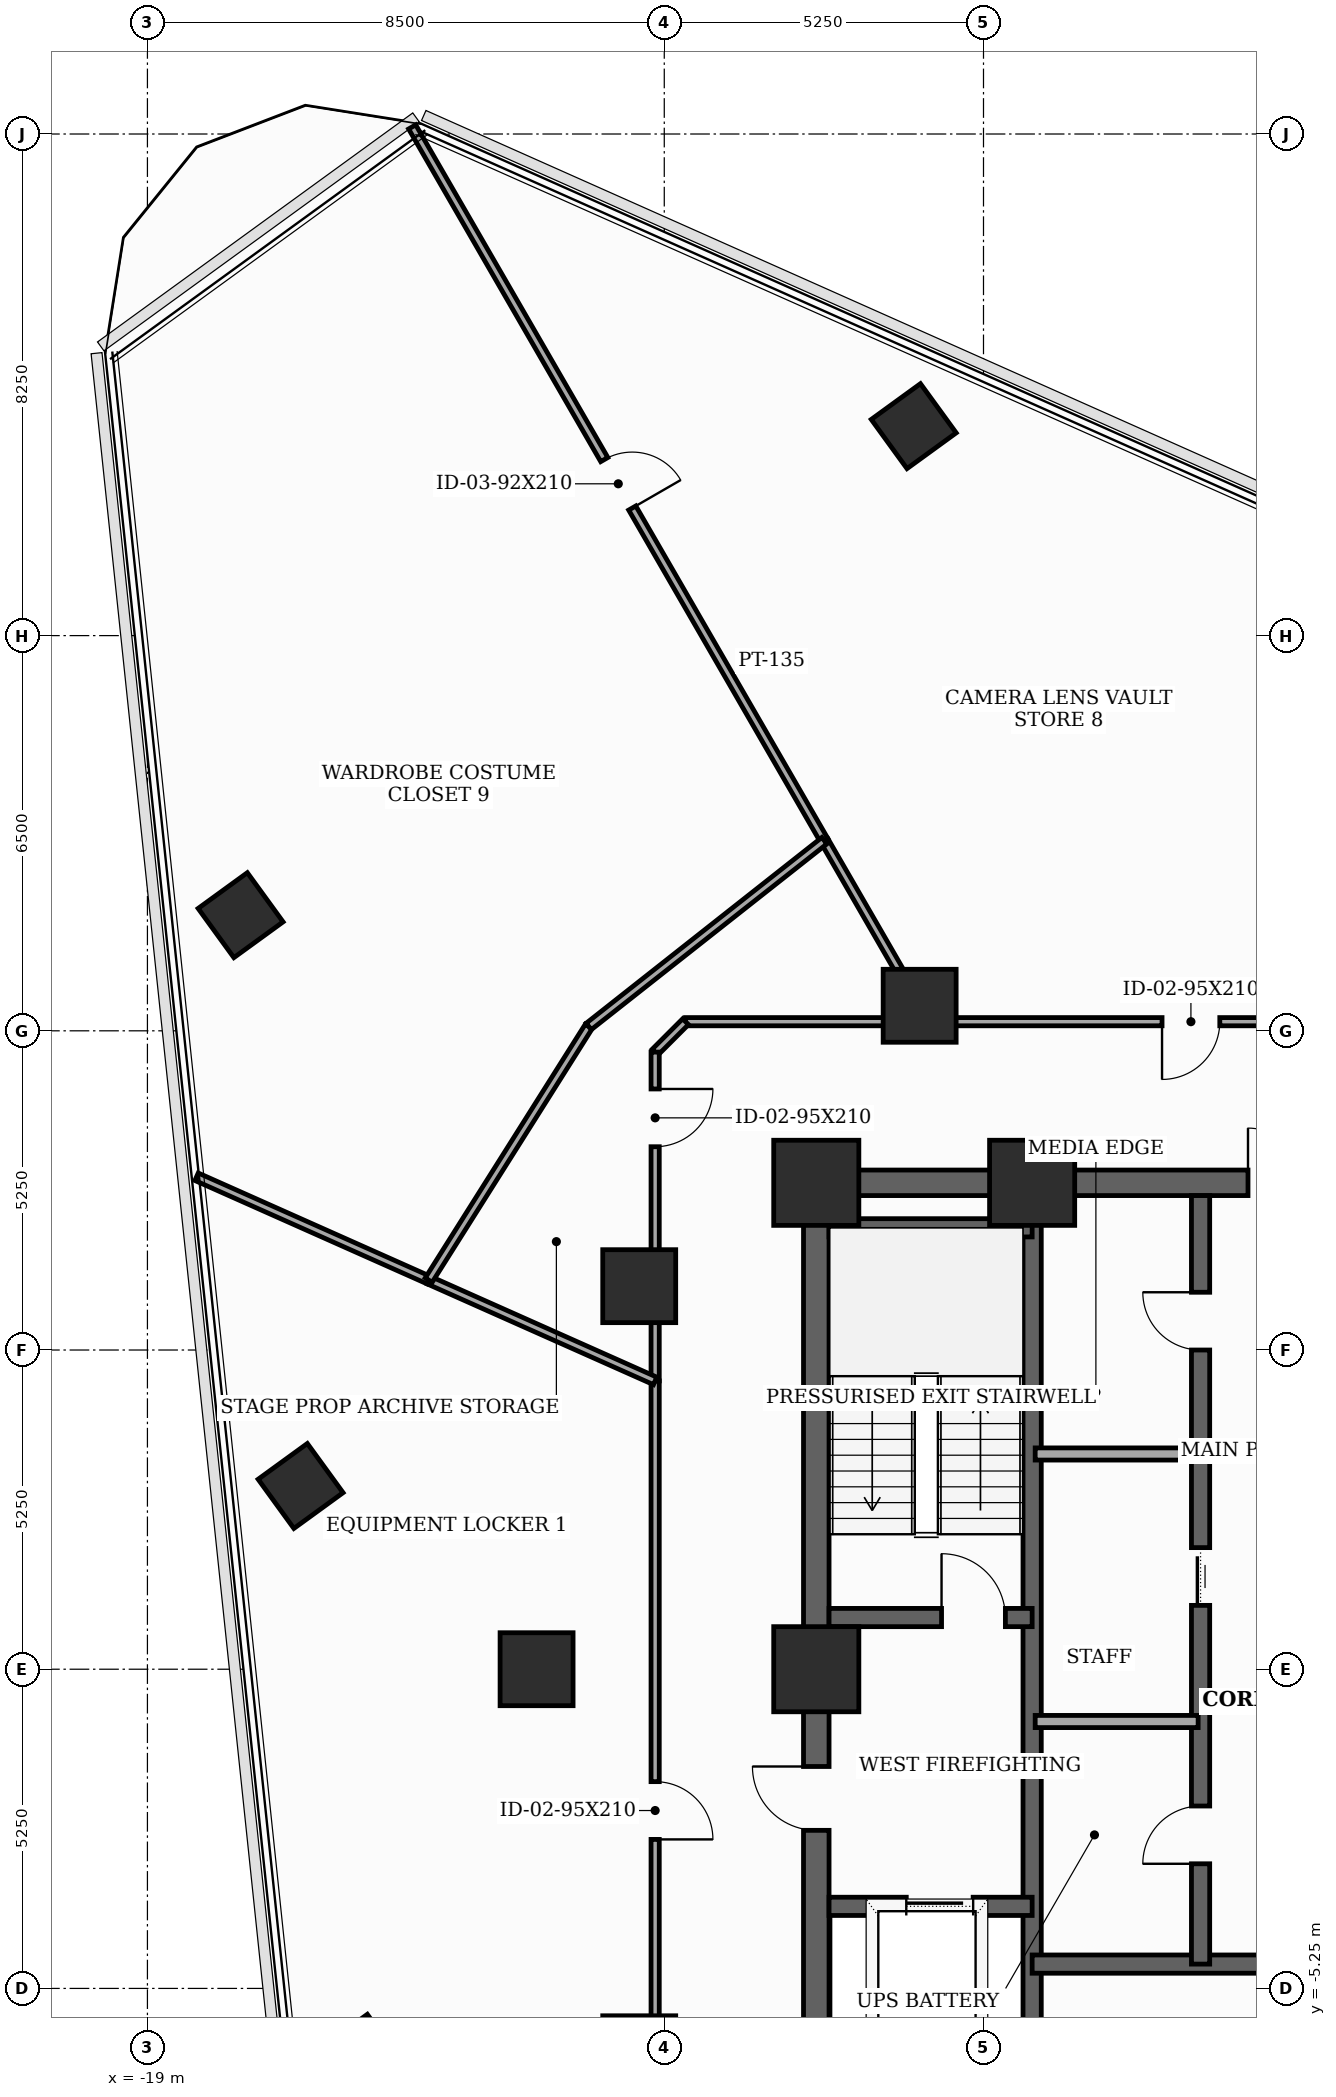
"""IFC4 building model, lengths in metres.
Left out: names, types, materials, properties, quantities, classifications, styles, units other than length and angle.
Written with IfcOpenShell. Run it as: python <this file> out.ifc"""

import sys

from ifc_helpers import new_model, si_unit, direction, frame, frame_2d, origin, origin_2d, place, context, subcontext, project, spatial, rectangle, extrude, element, fill, save


model = new_model("IFC4")
c1 = context("Model", 3, precision=1e-05, world=origin(), true_north=direction((0.0, 1.0)))
c2 = subcontext(c1, "Body", "Model", "MODEL_VIEW")
j1 = project(units=[si_unit("LENGTHUNIT", "METRE"), si_unit("PLANEANGLEUNIT", "RADIAN")], contexts=[c1])
p1 = place(None, origin())
s1 = spatial("IfcSite", under=j1, at=p1, CompositionType="ELEMENT")
p2 = place(p1, origin())
s2 = spatial("IfcBuilding", under=s1, at=p2, CompositionType="ELEMENT")
p3 = place(p2, frame((0.0, 0.0, 162.0)))
s3 = spatial("IfcBuildingStorey", under=s2, at=p3, CompositionType="ELEMENT", Elevation=162.0)
for number, where, z_axis, x_axis in (
    (1, (-4.45, 8.0, 0.0), (0.0, 0.0, 1.0), (1.0, 0.0, 0.0)),
    (2, (-8.0, 8.0, 0.0), (0.0, 0.0, 1.0), (1.0, 0.0, 0.0)),
    (3, (-8.0, 0.0, 0.0), (0.0, 0.0, 1.0), (1.0, 0.0, 0.0)),
):
    element("IfcColumn", number, at=place(p3, frame(where, z_axis=z_axis, x_axis=x_axis)), inside=s3, PredefinedType="COLUMN", context=c2, shape_type="SweptSolid", body=[
        extrude(rectangle(XDim=1.4, YDim=1.4, at=origin_2d()), origin(), (0.0, 0.0, 1.0), 3.7),
    ])
for number, where, z_axis, x_axis in (
    (4, (-6.3, 10.912, 0.0), (0.0, 0.0, 1.0), (1.0, 0.0, 0.0)),
    (5, (-10.912, 6.3, 0.0), (0.0, 0.0, 1.0), (1.0, 0.0, 0.0)),
    (6, (-12.6, 0.0, 0.0), (0.0, 0.0, 1.0), (1.0, 0.0, 0.0)),
    (7, (-10.912, -6.3, 0.0), (0.0, 0.0, 1.0), (1.0, 0.0, 0.0)),
):
    element("IfcColumn", number, at=place(p3, frame(where, z_axis=z_axis, x_axis=x_axis)), inside=s3, PredefinedType="COLUMN", context=c2, shape_type="SweptSolid", body=[
        extrude(rectangle(XDim=1.2, YDim=1.2, at=origin_2d()), origin(), (0.0, 0.0, 1.0), 3.7),
    ])
for number, where, z_axis, x_axis in (
    (8, (-6.397, 20.445, 0.0), (0.0, 0.0, 1.0), (0.809, 0.588, 0.0)),
    (9, (-17.468, 12.402, 0.0), (0.0, 0.0, 1.0), (0.809, 0.588, 0.0)),
    (10, (-16.481, 3.014, 0.0), (0.0, 0.0, 1.0), (0.809, 0.588, 0.0)),
    (11, (-15.494, -6.375, 0.0), (0.0, 0.0, 1.0), (0.809, 0.588, 0.0)),
):
    element("IfcColumn", number, at=place(p3, frame(where, z_axis=z_axis, x_axis=x_axis)), inside=s3, PredefinedType="COLUMN", context=c2, shape_type="SweptSolid", body=[
        extrude(rectangle(XDim=1.0, YDim=1.0, at=origin_2d()), origin(), (0.0, 0.0, 1.0), 3.7),
    ])
p4 = place(p3, frame((-8.0, -8.0, 0.0), z_axis=(0.0, 0.0, 1.0), x_axis=(0.0, 1.0, 0.0)))
e12 = element("IfcWall", 12, at=p4, inside=s3, PredefinedType="SHEAR", context=c2, shape_type="SweptSolid", body=[
    extrude(rectangle(XDim=16.0, YDim=0.42, at=frame_2d((8.0, 0.0))), origin(), (0.0, 0.0, 1.0), 3.5),
])
p5 = place(p4, frame((0.922, 0.0, 0.0)))
e13 = element("IfcOpeningElement", 13, at=p5, cuts=e12, PredefinedType="OPENING", context=c2, shape_type="SweptSolid", body=[
    extrude(rectangle(XDim=0.85, YDim=2.02, at=frame_2d((0.425, 1.01))), frame((0.0, 0.22, 0.0), z_axis=(0.0, -1.0, 0.0), x_axis=(1.0, 0.0, 0.0)), (0.0, 0.0, 1.0), 0.44),
])
p6 = place(p4, frame((5.35, 0.0, 0.0)))
e14 = element("IfcOpeningElement", 14, at=p6, cuts=e12, PredefinedType="OPENING", context=c2, shape_type="SweptSolid", body=[
    extrude(rectangle(XDim=1.05, YDim=2.15, at=frame_2d((0.525, 1.075))), frame((0.0, 0.22, 0.0), z_axis=(0.0, -1.0, 0.0), x_axis=(1.0, 0.0, 0.0)), (0.0, 0.0, 1.0), 0.44),
])
p7 = place(p3, frame((-8.0, 8.0, 0.0), z_axis=(0.0, 0.0, 1.0), x_axis=(1.0, 0.0, 0.0)))
e15 = element("IfcWall", 15, at=p7, inside=s3, PredefinedType="SHEAR", context=c2, shape_type="SweptSolid", body=[
    extrude(rectangle(XDim=16.0, YDim=0.42, at=frame_2d((8.0, 0.0))), origin(), (0.0, 0.0, 1.0), 3.5),
])
p8 = place(p7, frame((7.1, 0.0, 0.0)))
e16 = element("IfcOpeningElement", 16, at=p8, cuts=e15, PredefinedType="OPENING", context=c2, shape_type="SweptSolid", body=[
    extrude(rectangle(XDim=1.8, YDim=2.15, at=frame_2d((0.9, 1.075))), frame((0.0, 0.22, 0.0), z_axis=(0.0, -1.0, 0.0), x_axis=(1.0, 0.0, 0.0)), (0.0, 0.0, 1.0), 0.44),
])
p9 = place(p3, frame((-4.45, -7.79, 0.0), z_axis=(0.0, 0.0, 1.0), x_axis=(0.0, 1.0, 0.0)))
e17 = element("IfcWall", 17, at=p9, inside=s3, PredefinedType="SHEAR", context=c2, shape_type="SweptSolid", body=[
    extrude(rectangle(XDim=15.58, YDim=0.3, at=frame_2d((7.79, 0.0))), origin(), (0.0, 0.0, 1.0), 3.5),
])
p10 = place(p3, frame((-7.79, 0.85, 0.0), z_axis=(0.0, 0.0, 1.0), x_axis=(1.0, 0.0, 0.0)))
e18 = element("IfcWall", 18, at=p10, inside=s3, PredefinedType="SHEAR", context=c2, shape_type="SweptSolid", body=[
    extrude(rectangle(XDim=3.34, YDim=0.3, at=frame_2d((1.67, 0.0))), origin(), (0.0, 0.0, 1.0), 3.5),
])
p11 = place(p10, frame((1.85, 0.0, 0.0)))
e19 = element("IfcOpeningElement", 19, at=p11, cuts=e18, PredefinedType="OPENING", context=c2, shape_type="SweptSolid", body=[
    extrude(rectangle(XDim=1.05, YDim=2.15, at=frame_2d((0.525, 1.075))), frame((0.0, 0.16, 0.0), z_axis=(0.0, -1.0, 0.0), x_axis=(1.0, 0.0, 0.0)), (0.0, 0.0, 1.0), 0.32),
])
p12 = place(p3, frame((-7.79, 7.26, 0.0), z_axis=(0.0, 0.0, 1.0), x_axis=(1.0, 0.0, 0.0)))
e20 = element("IfcWall", 20, at=p12, inside=s3, PredefinedType="SHEAR", context=c2, shape_type="SweptSolid", body=[
    extrude(rectangle(XDim=3.34, YDim=0.3, at=frame_2d((1.67, 0.0))), origin(), (0.0, 0.0, 1.0), 3.5),
])
p13 = place(p3, frame((-7.79, -3.9, 0.0), z_axis=(0.0, 0.0, 1.0), x_axis=(1.0, 0.0, 0.0)))
e21 = element("IfcWall", 21, at=p13, inside=s3, PredefinedType="SHEAR", context=c2, shape_type="SweptSolid", body=[
    extrude(rectangle(XDim=3.34, YDim=0.3, at=frame_2d((1.67, 0.0))), origin(), (0.0, 0.0, 1.0), 3.5),
])
p14 = place(p13, frame((1.27, 0.0, 0.0)))
e22 = element("IfcOpeningElement", 22, at=p14, cuts=e21, PredefinedType="OPENING", context=c2, shape_type="SweptSolid", body=[
    extrude(rectangle(XDim=1.1, YDim=2.1, at=frame_2d((0.55, 1.05))), frame((0.0, 0.16, 0.0), z_axis=(0.0, -1.0, 0.0), x_axis=(1.0, 0.0, 0.0)), (0.0, 0.0, 1.0), 0.32),
])
p15 = place(p3, frame((-4.45, -4.85, 0.0), z_axis=(0.0, 0.0, 1.0), x_axis=(1.0, 0.0, 0.0)))
e23 = element("IfcWall", 23, at=p15, inside=s3, PredefinedType="SHEAR", context=c2, shape_type="SweptSolid", body=[
    extrude(rectangle(XDim=8.9, YDim=0.3, at=frame_2d((4.45, 0.0))), origin(), (0.0, 0.0, 1.0), 3.5),
])
p16 = place(p3, frame((-1.68, -4.85, 0.0), z_axis=(0.0, 0.0, 1.0), x_axis=(0.0, 1.0, 0.0)))
e24 = element("IfcWall", 24, at=p16, inside=s3, PredefinedType="SHEAR", context=c2, shape_type="SweptSolid", body=[
    extrude(rectangle(XDim=12.64, YDim=0.3, at=frame_2d((6.32, 0.0))), origin(), (0.0, 0.0, 1.0), 3.5),
])
p17 = place(p16, frame((1.65, 0.0, 0.0)))
e25 = element("IfcOpeningElement", 25, at=p17, cuts=e24, PredefinedType="OPENING", context=c2, shape_type="SweptSolid", body=[
    extrude(rectangle(XDim=0.95, YDim=2.1, at=frame_2d((0.475, 1.05))), frame((0.0, 0.16, 0.0), z_axis=(0.0, -1.0, 0.0), x_axis=(1.0, 0.0, 0.0)), (0.0, 0.0, 1.0), 0.32),
])
p18 = place(p16, frame((5.9, 0.0, 0.0)))
e26 = element("IfcOpeningElement", 26, at=p18, cuts=e24, PredefinedType="OPENING", context=c2, shape_type="SweptSolid", body=[
    extrude(rectangle(XDim=0.95, YDim=2.1, at=frame_2d((0.475, 1.05))), frame((0.0, 0.16, 0.0), z_axis=(0.0, -1.0, 0.0), x_axis=(1.0, 0.0, 0.0)), (0.0, 0.0, 1.0), 0.32),
])
p19 = place(p16, frame((10.1, 0.0, 0.0)))
e27 = element("IfcOpeningElement", 27, at=p19, cuts=e24, PredefinedType="OPENING", context=c2, shape_type="SweptSolid", body=[
    extrude(rectangle(XDim=0.95, YDim=2.1, at=frame_2d((0.475, 1.05))), frame((0.0, 0.16, 0.0), z_axis=(0.0, -1.0, 0.0), x_axis=(1.0, 0.0, 0.0)), (0.0, 0.0, 1.0), 0.32),
])
for number, where, z_axis, x_axis in (
    (28, (-4.4, -0.86, 0.0), (0.0, 0.0, 1.0), (1.0, 0.0, 0.0)),
    (29, (-4.4, 3.54, 0.0), (0.0, 0.0, 1.0), (1.0, 0.0, 0.0)),
):
    element("IfcWall", number, at=place(p3, frame(where, z_axis=z_axis, x_axis=x_axis)), inside=s3, PredefinedType="SOLIDWALL", context=c2, shape_type="SweptSolid", body=[
        extrude(rectangle(XDim=2.68, YDim=0.2, at=frame_2d((1.34, 0.0))), origin(), (0.0, 0.0, 1.0), 3.5),
    ])
p20 = place(p3, frame((-10.65, 4.742, 0.0), z_axis=(0.0, 0.0, 1.0), x_axis=(0.0, -1.0, 0.0)))
e30 = element("IfcWall", 30, at=p20, inside=s3, PredefinedType="PARTITIONING", context=c2, shape_type="SweptSolid", body=[
    extrude(rectangle(XDim=11.397, YDim=0.135, at=frame_2d((5.698, 0.0))), origin(), (0.0, 0.0, 1.0), 2.885),
])
p21 = place(p20, frame((6.591, 0.0, 0.0)))
e31 = element("IfcOpeningElement", 31, at=p21, cuts=e30, PredefinedType="OPENING", context=c2, shape_type="SweptSolid", body=[
    extrude(rectangle(XDim=0.95, YDim=2.1, at=frame_2d((0.475, 1.05))), frame((0.0, 0.077, 0.0), z_axis=(0.0, -1.0, 0.0), x_axis=(1.0, 0.0, 0.0)), (0.0, 0.0, 1.0), 0.155),
])
p22 = place(p3, frame((5.194, 10.65, 0.0), z_axis=(0.0, 0.0, 1.0), x_axis=(-1.0, 0.0, 0.0)))
e32 = element("IfcWall", 32, at=p22, inside=s3, PredefinedType="PARTITIONING", context=c2, shape_type="SweptSolid", body=[
    extrude(rectangle(XDim=11.343, YDim=0.135, at=frame_2d((5.671, 0.0))), origin(), (0.0, 0.0, 1.0), 2.885),
])
p23 = place(p22, frame((6.558, 0.0, 0.0)))
e33 = element("IfcOpeningElement", 33, at=p23, cuts=e32, PredefinedType="OPENING", context=c2, shape_type="SweptSolid", body=[
    extrude(rectangle(XDim=0.95, YDim=2.1, at=frame_2d((0.475, 1.05))), frame((0.0, 0.077, 0.0), z_axis=(0.0, -1.0, 0.0), x_axis=(1.0, 0.0, 0.0)), (0.0, 0.0, 1.0), 0.155),
])
p24 = place(p3, frame((-6.149, 10.65, 0.0), z_axis=(0.0, 0.0, 1.0), x_axis=(-1.0, 0.0, 0.0)))
e34 = element("IfcWall", 34, at=p24, inside=s3, PredefinedType="PARTITIONING", context=c2, shape_type="SweptSolid", body=[
    extrude(rectangle(XDim=4.001, YDim=0.135, at=frame_2d((2.0, 0.0))), origin(), (0.0, 0.0, 1.0), 2.885),
])
p25 = place(p3, frame((-10.15, 10.65, 0.0), z_axis=(0.0, 0.0, 1.0), x_axis=(-0.707106781187, -0.707106781187, 0.0)))
e35 = element("IfcWall", 35, at=p25, inside=s3, PredefinedType="PARTITIONING", context=c2, shape_type="SweptSolid", body=[
    extrude(rectangle(XDim=0.707, YDim=0.135, at=frame_2d((0.354, 0.0))), origin(), (0.0, 0.0, 1.0), 3.5),
])
p26 = place(p3, frame((-10.65, 10.15, 0.0), z_axis=(0.0, 0.0, 1.0), x_axis=(0.0, -1.0, 0.0)))
e36 = element("IfcWall", 36, at=p26, inside=s3, PredefinedType="PARTITIONING", context=c2, shape_type="SweptSolid", body=[
    extrude(rectangle(XDim=5.408, YDim=0.135, at=frame_2d((2.704, 0.0))), origin(), (0.0, 0.0, 1.0), 2.885),
])
p27 = place(p26, frame((0.607, 0.0, 0.0)))
e37 = element("IfcOpeningElement", 37, at=p27, cuts=e36, PredefinedType="OPENING", context=c2, shape_type="SweptSolid", body=[
    extrude(rectangle(XDim=0.95, YDim=2.1, at=frame_2d((0.475, 1.05))), frame((0.0, 0.077, 0.0), z_axis=(0.0, -1.0, 0.0), x_axis=(1.0, 0.0, 0.0)), (0.0, 0.0, 1.0), 0.155),
])
p28 = place(p3, frame((-14.374, 6.4, 0.0), z_axis=(0.0, 0.0, 1.0), x_axis=(-0.913556010805, 0.406712939457, 0.0)))
e38 = element("IfcWall", 38, at=p28, inside=s3, PredefinedType="PARTITIONING", context=c2, shape_type="SweptSolid", body=[
    extrude(rectangle(XDim=4.179, YDim=0.135, at=frame_2d((2.09, 0.0))), origin(), (0.0, 0.0, 1.0), 2.985),
])
p29 = place(p3, frame((-10.65, 4.742, 0.0), z_axis=(0.0, 0.0, 1.0), x_axis=(-0.913556992648, 0.406710734042, 0.0)))
e39 = element("IfcWall", 39, at=p29, inside=s3, PredefinedType="PARTITIONING", context=c2, shape_type="SweptSolid", body=[
    extrude(rectangle(XDim=4.076, YDim=0.135, at=frame_2d((2.038, 0.0))), origin(), (0.0, 0.0, 1.0), 2.885),
])
p30 = place(p3, frame((-14.646, 25.367, 0.0), z_axis=(0.0, 0.0, 1.0), x_axis=(0.500047745944, -0.865997835896, 0.0)))
e40 = element("IfcWall", 40, at=p30, inside=s3, PredefinedType="PARTITIONING", context=c2, shape_type="SweptSolid", body=[
    extrude(rectangle(XDim=13.556, YDim=0.135, at=frame_2d((6.778, 0.0))), origin(), (0.0, 0.0, 1.0), 2.985),
])
p31 = place(p30, frame((6.318, 0.0, 0.0)))
e41 = element("IfcOpeningElement", 41, at=p31, cuts=e40, PredefinedType="OPENING", context=c2, shape_type="SweptSolid", body=[
    extrude(rectangle(XDim=0.92, YDim=2.1, at=frame_2d((0.46, 1.05))), frame((0.0, 0.077, 0.0), z_axis=(0.0, -1.0, 0.0), x_axis=(1.0, 0.0, 0.0)), (0.0, 0.0, 1.0), 0.155),
])
p32 = place(p3, frame((-7.867, 13.627, 0.0), z_axis=(0.0, 0.0, 1.0), x_axis=(0.499829032188, -0.866124089598, 0.0)))
e42 = element("IfcWall", 42, at=p32, inside=s3, PredefinedType="PARTITIONING", context=c2, shape_type="SweptSolid", body=[
    extrude(rectangle(XDim=3.437, YDim=0.135, at=frame_2d((1.719, 0.0))), origin(), (0.0, 0.0, 1.0), 2.885),
])
p33 = place(p3, frame((-14.374, 6.4, 0.0), z_axis=(0.0, 0.0, 1.0), x_axis=(0.53356651363, 0.845758106986, 0.0)))
e43 = element("IfcWall", 43, at=p33, inside=s3, PredefinedType="PARTITIONING", context=c2, shape_type="SweptSolid", body=[
    extrude(rectangle(XDim=4.933, YDim=0.135, at=frame_2d((2.467, 0.0))), origin(), (0.0, 0.0, 1.0), 2.885),
])
p34 = place(p3, frame((-11.742, 10.572, 0.0), z_axis=(0.0, 0.0, 1.0), x_axis=(0.785304323173, 0.619109941776, 0.0)))
e44 = element("IfcWall", 44, at=p34, inside=s3, PredefinedType="PARTITIONING", context=c2, shape_type="SweptSolid", body=[
    extrude(rectangle(XDim=4.934, YDim=0.135, at=frame_2d((2.467, 0.0))), origin(), (0.0, 0.0, 1.0), 3.5),
])
p35 = place(p6, origin())
e45 = element("IfcDoor", 45, at=p35, inside=s3, OperationType="SINGLE_SWING_RIGHT", PredefinedType="DOOR", context=c2, shape_type="SweptSolid", body=[
    extrude(rectangle(XDim=1.05, YDim=2.15, at=frame_2d((0.525, 1.075))), frame((0.0, 0.025, 0.0), z_axis=(0.0, -1.0, 0.0), x_axis=(1.0, 0.0, 0.0)), (0.0, 0.0, 1.0), 0.05),
])
fill(e14, e45)
p36 = place(p8, origin())
e46 = element("IfcDoor", 46, at=p36, inside=s3, OperationType="DOUBLE_DOOR_SINGLE_SWING", PredefinedType="DOOR", context=c2, shape_type="SweptSolid", body=[
    extrude(rectangle(XDim=1.8, YDim=2.15, at=frame_2d((0.9, 1.075))), frame((0.0, 0.025, 0.0), z_axis=(0.0, -1.0, 0.0), x_axis=(1.0, 0.0, 0.0)), (0.0, 0.0, 1.0), 0.05),
])
fill(e16, e46)
p37 = place(p11, origin())
e47 = element("IfcDoor", 47, at=p37, inside=s3, OperationType="SINGLE_SWING_LEFT", PredefinedType="DOOR", context=c2, shape_type="SweptSolid", body=[
    extrude(rectangle(XDim=1.05, YDim=2.15, at=frame_2d((0.525, 1.075))), frame((0.0, 0.025, 0.0), z_axis=(0.0, -1.0, 0.0), x_axis=(1.0, 0.0, 0.0)), (0.0, 0.0, 1.0), 0.05),
])
fill(e19, e47)
p38 = place(p14, origin())
e48 = element("IfcDoor", 48, at=p38, inside=s3, OperationType="SLIDING_TO_LEFT", PredefinedType="DOOR", context=c2, shape_type="SweptSolid", body=[
    extrude(rectangle(XDim=1.1, YDim=2.1, at=frame_2d((0.55, 1.05))), frame((0.0, 0.025, 0.0), z_axis=(0.0, -1.0, 0.0), x_axis=(1.0, 0.0, 0.0)), (0.0, 0.0, 1.0), 0.05),
])
fill(e22, e48)
p39 = place(p17, origin())
e49 = element("IfcDoor", 49, at=p39, inside=s3, OperationType="SINGLE_SWING_LEFT", PredefinedType="DOOR", context=c2, shape_type="SweptSolid", body=[
    extrude(rectangle(XDim=0.95, YDim=2.1, at=frame_2d((0.475, 1.05))), frame((0.0, 0.025, 0.0), z_axis=(0.0, -1.0, 0.0), x_axis=(1.0, 0.0, 0.0)), (0.0, 0.0, 1.0), 0.05),
])
fill(e25, e49)
p40 = place(p18, origin())
e50 = element("IfcDoor", 50, at=p40, inside=s3, OperationType="SLIDING_TO_LEFT", PredefinedType="DOOR", context=c2, shape_type="SweptSolid", body=[
    extrude(rectangle(XDim=0.95, YDim=2.1, at=frame_2d((0.475, 1.05))), frame((0.0, 0.025, 0.0), z_axis=(0.0, -1.0, 0.0), x_axis=(1.0, 0.0, 0.0)), (0.0, 0.0, 1.0), 0.05),
])
fill(e26, e50)
p41 = place(p19, origin())
e51 = element("IfcDoor", 51, at=p41, inside=s3, OperationType="SINGLE_SWING_RIGHT", PredefinedType="DOOR", context=c2, shape_type="SweptSolid", body=[
    extrude(rectangle(XDim=0.95, YDim=2.1, at=frame_2d((0.475, 1.05))), frame((0.0, 0.025, 0.0), z_axis=(0.0, -1.0, 0.0), x_axis=(1.0, 0.0, 0.0)), (0.0, 0.0, 1.0), 0.05),
])
fill(e27, e51)
p42 = place(p21, origin())
e52 = element("IfcDoor", 52, at=p42, inside=s3, OperationType="SINGLE_SWING_RIGHT", PredefinedType="DOOR", context=c2, shape_type="SweptSolid", body=[
    extrude(rectangle(XDim=0.95, YDim=2.1, at=frame_2d((0.475, 1.05))), frame((0.0, 0.025, 0.0), z_axis=(0.0, -1.0, 0.0), x_axis=(1.0, 0.0, 0.0)), (0.0, 0.0, 1.0), 0.05),
])
fill(e31, e52)
p43 = place(p23, origin())
e53 = element("IfcDoor", 53, at=p43, inside=s3, OperationType="SINGLE_SWING_RIGHT", PredefinedType="DOOR", context=c2, shape_type="SweptSolid", body=[
    extrude(rectangle(XDim=0.95, YDim=2.1, at=frame_2d((0.475, 1.05))), frame((0.0, 0.025, 0.0), z_axis=(0.0, -1.0, 0.0), x_axis=(1.0, 0.0, 0.0)), (0.0, 0.0, 1.0), 0.05),
])
fill(e33, e53)
p44 = place(p27, origin())
e54 = element("IfcDoor", 54, at=p44, inside=s3, OperationType="SINGLE_SWING_LEFT", PredefinedType="DOOR", context=c2, shape_type="SweptSolid", body=[
    extrude(rectangle(XDim=0.95, YDim=2.1, at=frame_2d((0.475, 1.05))), frame((0.0, 0.025, 0.0), z_axis=(0.0, -1.0, 0.0), x_axis=(1.0, 0.0, 0.0)), (0.0, 0.0, 1.0), 0.05),
])
fill(e37, e54)
p45 = place(p31, origin())
e55 = element("IfcDoor", 55, at=p45, inside=s3, OperationType="SINGLE_SWING_RIGHT", PredefinedType="DOOR", context=c2, shape_type="SweptSolid", body=[
    extrude(rectangle(XDim=0.92, YDim=2.1, at=frame_2d((0.46, 1.05))), frame((0.0, 0.025, 0.0), z_axis=(0.0, -1.0, 0.0), x_axis=(1.0, 0.0, 0.0)), (0.0, 0.0, 1.0), 0.05),
])
fill(e41, e55)
save(model, sys.argv[1])
